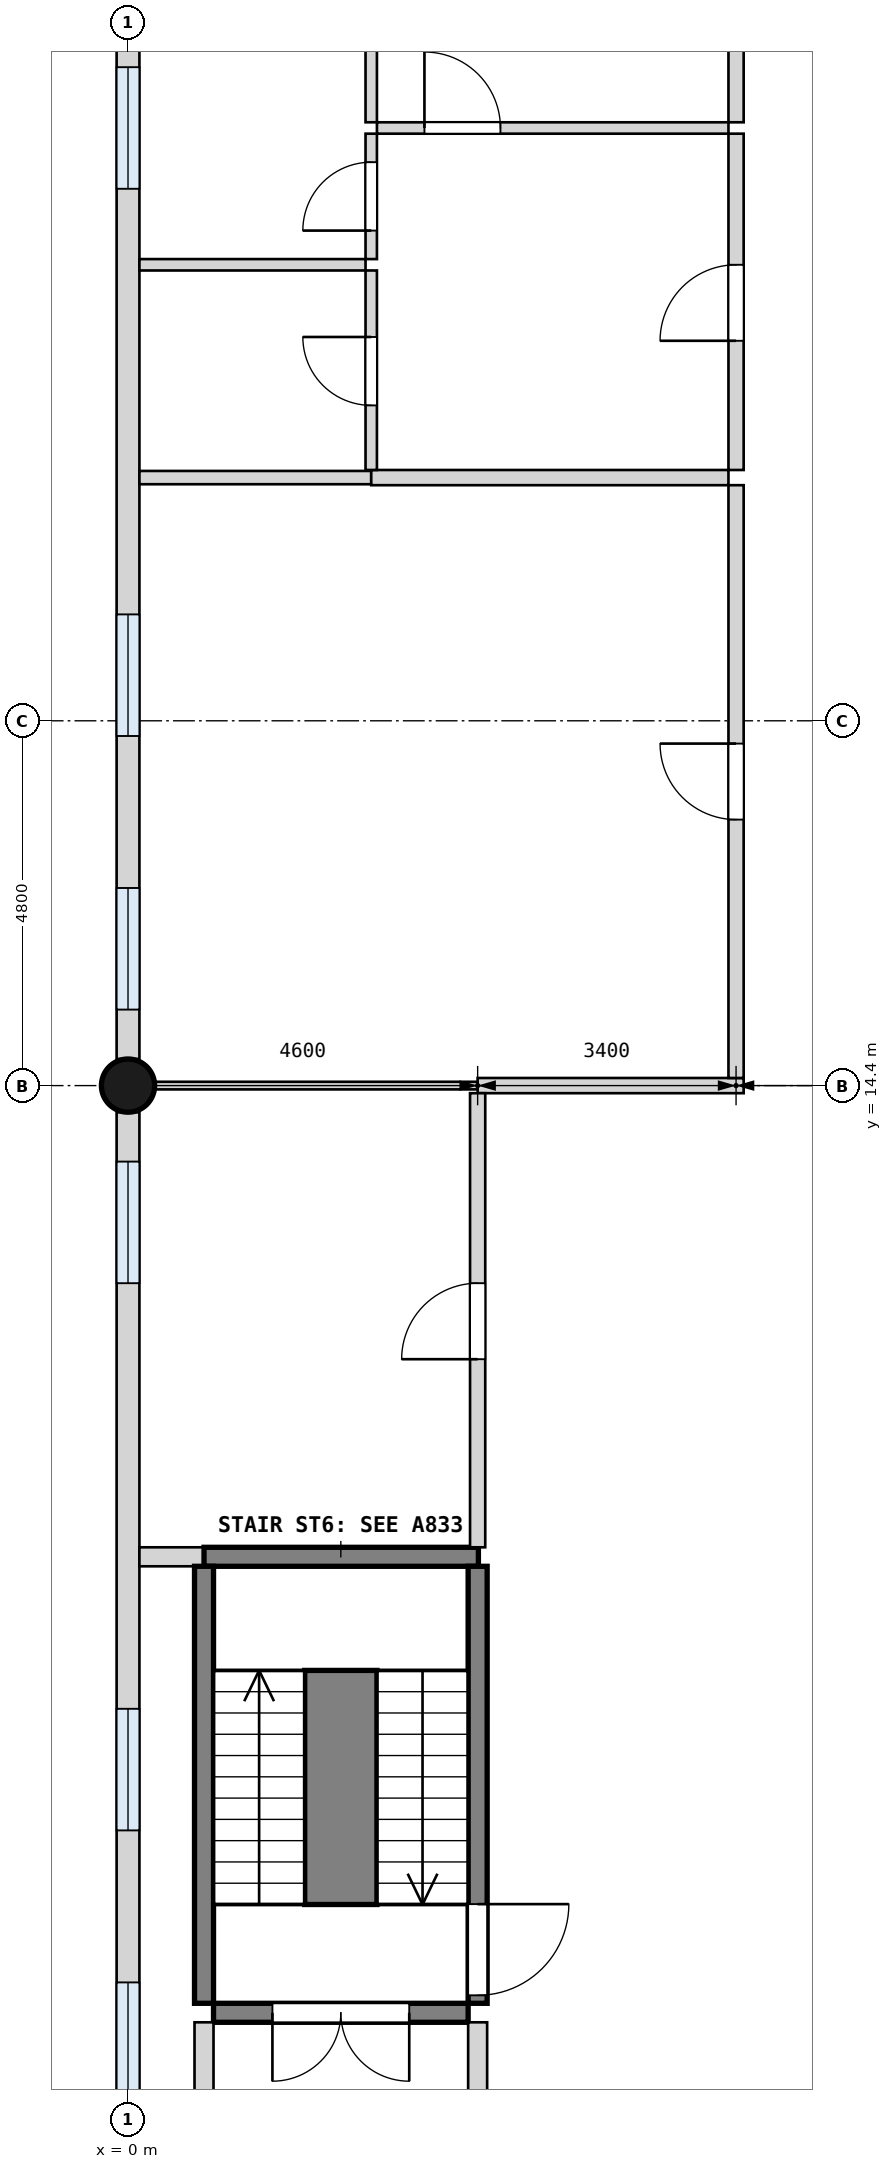
"""IFC4 building model, lengths in metres.
Left out: names, types, materials, properties, quantities, classifications, styles, units other than length and angle.
Written with IfcOpenShell. Run it as: python <this file> out.ifc"""

import sys

from ifc_helpers import new_model, si_unit, direction, frame, frame_2d, origin, origin_2d, place, context, subcontext, project, spatial, rectangle, circle, extrude, element, fill, save


model = new_model("IFC4")
c1 = context("Model", 3, precision=1e-05, world=origin(), true_north=direction((0.0, 1.0)))
c2 = subcontext(c1, "Body", "Model", "MODEL_VIEW")
j1 = project(units=[si_unit("LENGTHUNIT", "METRE"), si_unit("PLANEANGLEUNIT", "RADIAN")], contexts=[c1])
p1 = place(None, origin())
s1 = spatial("IfcSite", under=j1, at=p1, CompositionType="ELEMENT")
p2 = place(p1, origin())
s2 = spatial("IfcBuilding", under=s1, at=p2, CompositionType="ELEMENT")
p3 = place(p2, origin())
s3 = spatial("IfcBuildingStorey", under=s2, at=p3, CompositionType="ELEMENT", Elevation=0.0)
p4 = place(p3, frame((0.0, 14.4, 0.0), z_axis=(0.0, 0.0, 1.0), x_axis=(1.0, 0.0, 0.0)))
e1 = element("IfcColumn", 1, at=p4, inside=s3, PredefinedType="COLUMN", context=c2, shape_type="SweptSolid", body=[
    extrude(circle(Radius=0.35, at=origin_2d()), origin(), (0.0, 0.0, 1.0), 4.2),
])
p5 = place(p3, frame((0.0, 0.35, 0.0), z_axis=(0.0, 0.0, 1.0), x_axis=(0.0, 1.0, 0.0)))
e2 = element("IfcWall", 2, at=p5, inside=s3, PredefinedType="SOLIDWALL", context=c2, shape_type="SweptSolid", body=[
    extrude(rectangle(XDim=13.7, YDim=0.3, at=frame_2d((6.85, 0.0))), origin(), (0.0, 0.0, 1.0), 3.0),
])
p6 = place(p5, frame((0.65, 0.0, 0.3)))
e3 = element("IfcOpeningElement", 3, at=p6, cuts=e2, PredefinedType="OPENING", context=c2, shape_type="SweptSolid", body=[
    extrude(rectangle(XDim=1.6, YDim=2.4, at=frame_2d((0.8, 1.2))), frame((0.0, 0.16, 0.0), z_axis=(0.0, -1.0, 0.0), x_axis=(1.0, 0.0, 0.0)), (0.0, 0.0, 1.0), 0.32),
])
p7 = place(p5, frame((4.25, 0.0, 0.3)))
e4 = element("IfcOpeningElement", 4, at=p7, cuts=e2, PredefinedType="OPENING", context=c2, shape_type="SweptSolid", body=[
    extrude(rectangle(XDim=1.6, YDim=2.4, at=frame_2d((0.8, 1.2))), frame((0.0, 0.16, 0.0), z_axis=(0.0, -1.0, 0.0), x_axis=(1.0, 0.0, 0.0)), (0.0, 0.0, 1.0), 0.32),
])
p8 = place(p5, frame((11.45, 0.0, 0.3)))
e5 = element("IfcOpeningElement", 5, at=p8, cuts=e2, PredefinedType="OPENING", context=c2, shape_type="SweptSolid", body=[
    extrude(rectangle(XDim=1.6, YDim=2.4, at=frame_2d((0.8, 1.2))), frame((0.0, 0.16, 0.0), z_axis=(0.0, -1.0, 0.0), x_axis=(1.0, 0.0, 0.0)), (0.0, 0.0, 1.0), 0.32),
])
p9 = place(p3, frame((0.0, 14.75, 0.0), z_axis=(0.0, 0.0, 1.0), x_axis=(0.0, 1.0, 0.0)))
e6 = element("IfcWall", 6, at=p9, inside=s3, PredefinedType="SOLIDWALL", context=c2, shape_type="SweptSolid", body=[
    extrude(rectangle(XDim=13.7, YDim=0.3, at=frame_2d((6.85, 0.0))), origin(), (0.0, 0.0, 1.0), 3.0),
])
p10 = place(p9, frame((0.65, 0.0, 0.3)))
e7 = element("IfcOpeningElement", 7, at=p10, cuts=e6, PredefinedType="OPENING", context=c2, shape_type="SweptSolid", body=[
    extrude(rectangle(XDim=1.6, YDim=2.4, at=frame_2d((0.8, 1.2))), frame((0.0, 0.16, 0.0), z_axis=(0.0, -1.0, 0.0), x_axis=(1.0, 0.0, 0.0)), (0.0, 0.0, 1.0), 0.32),
])
p11 = place(p9, frame((4.25, 0.0, 0.3)))
e8 = element("IfcOpeningElement", 8, at=p11, cuts=e6, PredefinedType="OPENING", context=c2, shape_type="SweptSolid", body=[
    extrude(rectangle(XDim=1.6, YDim=2.4, at=frame_2d((0.8, 1.2))), frame((0.0, 0.16, 0.0), z_axis=(0.0, -1.0, 0.0), x_axis=(1.0, 0.0, 0.0)), (0.0, 0.0, 1.0), 0.32),
])
p12 = place(p9, frame((11.45, 0.0, 0.3)))
e9 = element("IfcOpeningElement", 9, at=p12, cuts=e6, PredefinedType="OPENING", context=c2, shape_type="SweptSolid", body=[
    extrude(rectangle(XDim=1.6, YDim=2.4, at=frame_2d((0.8, 1.2))), frame((0.0, 0.16, 0.0), z_axis=(0.0, -1.0, 0.0), x_axis=(1.0, 0.0, 0.0)), (0.0, 0.0, 1.0), 0.32),
])
p13 = place(p3, frame((1.125, 2.2, 0.0), z_axis=(0.0, 0.0, 1.0), x_axis=(1.0, 0.0, 0.0)))
e10 = element("IfcWall", 10, at=p13, inside=s3, PredefinedType="SHEAR", context=c2, shape_type="SweptSolid", body=[
    extrude(rectangle(XDim=3.35, YDim=0.25, at=frame_2d((1.675, 0.0))), origin(), (0.0, 0.0, 1.0), 3.9),
])
p14 = place(p13, frame((0.775, 0.0, 0.0)))
e11 = element("IfcOpeningElement", 11, at=p14, cuts=e10, PredefinedType="OPENING", context=c2, shape_type="SweptSolid", body=[
    extrude(rectangle(XDim=1.8, YDim=2.1, at=frame_2d((0.9, 1.05))), frame((0.0, 0.135, 0.0), z_axis=(0.0, -1.0, 0.0), x_axis=(1.0, 0.0, 0.0)), (0.0, 0.0, 1.0), 0.27),
])
p15 = place(p3, frame((0.15, 8.2, 0.0), z_axis=(0.0, 0.0, 1.0), x_axis=(1.0, 0.0, 0.0)))
e12 = element("IfcWall", 12, at=p15, inside=s3, PredefinedType="PARTITIONING", context=c2, shape_type="SweptSolid", body=[
    extrude(rectangle(XDim=0.85, YDim=0.25, at=frame_2d((0.425, 0.0))), origin(), (0.0, 0.0, 1.0), 3.9),
])
p16 = place(p3, frame((1.0, 8.2, 0.0), z_axis=(0.0, 0.0, 1.0), x_axis=(1.0, 0.0, 0.0)))
e13 = element("IfcWall", 13, at=p16, inside=s3, PredefinedType="SHEAR", context=c2, shape_type="SweptSolid", body=[
    extrude(rectangle(XDim=3.61, YDim=0.25, at=frame_2d((1.805, 0.0))), origin(), (0.0, 0.0, 1.0), 3.9),
])
p17 = place(p3, frame((0.32, 14.4, 0.0), z_axis=(0.0, 0.0, 1.0), x_axis=(1.0, 0.0, 0.0)))
e14 = element("IfcWall", 14, at=p17, inside=s3, PredefinedType="PARTITIONING", context=c2, shape_type="SweptSolid", body=[
    extrude(rectangle(XDim=4.28, YDim=0.1, at=frame_2d((2.14, 0.0))), origin(), (0.0, 0.0, 1.0), 3.1),
])
p18 = place(p3, frame((4.6, 14.4, 0.0), z_axis=(0.0, 0.0, 1.0), x_axis=(1.0, 0.0, 0.0)))
e15 = element("IfcWall", 15, at=p18, inside=s3, PredefinedType="PARTITIONING", context=c2, shape_type="SweptSolid", body=[
    extrude(rectangle(XDim=3.5, YDim=0.2, at=frame_2d((1.75, 0.0))), origin(), (0.0, 0.0, 1.0), 3.1),
])
p19 = place(p3, frame((0.15, 22.4, 0.0), z_axis=(0.0, 0.0, 1.0), x_axis=(1.0, 0.0, 0.0)))
e16 = element("IfcWall", 16, at=p19, inside=s3, PredefinedType="PARTITIONING", context=c2, shape_type="SweptSolid", body=[
    extrude(rectangle(XDim=3.05, YDim=0.175, at=frame_2d((1.525, 0.0))), origin(), (0.0, 0.0, 1.0), 3.9),
])
p20 = place(p3, frame((3.2, 22.4, 0.0), z_axis=(0.0, 0.0, 1.0), x_axis=(1.0, 0.0, 0.0)))
e17 = element("IfcWall", 17, at=p20, inside=s3, PredefinedType="PARTITIONING", context=c2, shape_type="SweptSolid", body=[
    extrude(rectangle(XDim=4.7, YDim=0.2, at=frame_2d((2.35, 0.0))), origin(), (0.0, 0.0, 1.0), 3.9),
])
p21 = place(p3, frame((0.15, 25.2, 0.0), z_axis=(0.0, 0.0, 1.0), x_axis=(1.0, 0.0, 0.0)))
e18 = element("IfcWall", 18, at=p21, inside=s3, PredefinedType="PARTITIONING", context=c2, shape_type="SweptSolid", body=[
    extrude(rectangle(XDim=2.975, YDim=0.15, at=frame_2d((1.488, 0.0))), origin(), (0.0, 0.0, 1.0), 3.9),
])
p22 = place(p3, frame((3.275, 27.0, 0.0), z_axis=(0.0, 0.0, 1.0), x_axis=(1.0, 0.0, 0.0)))
e19 = element("IfcWall", 19, at=p22, inside=s3, PredefinedType="PARTITIONING", context=c2, shape_type="SweptSolid", body=[
    extrude(rectangle(XDim=4.625, YDim=0.15, at=frame_2d((2.312, 0.0))), origin(), (0.0, 0.0, 1.0), 3.9),
])
p23 = place(p22, frame((0.625, 0.0, 0.0)))
e20 = element("IfcOpeningElement", 20, at=p23, cuts=e19, PredefinedType="OPENING", context=c2, shape_type="SweptSolid", body=[
    extrude(rectangle(XDim=1.0, YDim=2.1, at=frame_2d((0.5, 1.05))), frame((0.0, 0.085, 0.0), z_axis=(0.0, -1.0, 0.0), x_axis=(1.0, 0.0, 0.0)), (0.0, 0.0, 1.0), 0.17),
])
p24 = place(p3, frame((1.0, 0.15, 0.0), z_axis=(0.0, 0.0, 1.0), x_axis=(0.0, 1.0, 0.0)))
e21 = element("IfcWall", 21, at=p24, inside=s3, PredefinedType="PARTITIONING", context=c2, shape_type="SweptSolid", body=[
    extrude(rectangle(XDim=1.925, YDim=0.25, at=frame_2d((0.962, 0.0))), origin(), (0.0, 0.0, 1.0), 3.9),
])
p25 = place(p3, frame((1.0, 2.325, 0.0), z_axis=(0.0, 0.0, 1.0), x_axis=(0.0, 1.0, 0.0)))
e22 = element("IfcWall", 22, at=p25, inside=s3, PredefinedType="SHEAR", context=c2, shape_type="SweptSolid", body=[
    extrude(rectangle(XDim=5.75, YDim=0.25, at=frame_2d((2.875, 0.0))), origin(), (0.0, 0.0, 1.0), 3.9),
])
p26 = place(p3, frame((3.2, 22.5, 0.0), z_axis=(0.0, 0.0, 1.0), x_axis=(0.0, 1.0, 0.0)))
e23 = element("IfcWall", 23, at=p26, inside=s3, PredefinedType="PARTITIONING", context=c2, shape_type="SweptSolid", body=[
    extrude(rectangle(XDim=2.625, YDim=0.15, at=frame_2d((1.312, 0.0))), origin(), (0.0, 0.0, 1.0), 3.0),
])
p27 = place(p26, frame((0.85, 0.0, 0.0)))
e24 = element("IfcOpeningElement", 24, at=p27, cuts=e23, PredefinedType="OPENING", context=c2, shape_type="SweptSolid", body=[
    extrude(rectangle(XDim=0.9, YDim=2.1, at=frame_2d((0.45, 1.05))), frame((0.0, 0.085, 0.0), z_axis=(0.0, -1.0, 0.0), x_axis=(1.0, 0.0, 0.0)), (0.0, 0.0, 1.0), 0.17),
])
p28 = place(p3, frame((3.2, 25.275, 0.0), z_axis=(0.0, 0.0, 1.0), x_axis=(0.0, 1.0, 0.0)))
e25 = element("IfcWall", 25, at=p28, inside=s3, PredefinedType="PARTITIONING", context=c2, shape_type="SweptSolid", body=[
    extrude(rectangle(XDim=1.65, YDim=0.15, at=frame_2d((0.825, 0.0))), origin(), (0.0, 0.0, 1.0), 3.0),
])
p29 = place(p28, frame((0.375, 0.0, 0.0)))
e26 = element("IfcOpeningElement", 26, at=p29, cuts=e25, PredefinedType="OPENING", context=c2, shape_type="SweptSolid", body=[
    extrude(rectangle(XDim=0.9, YDim=2.1, at=frame_2d((0.45, 1.05))), frame((0.0, 0.085, 0.0), z_axis=(0.0, -1.0, 0.0), x_axis=(1.0, 0.0, 0.0)), (0.0, 0.0, 1.0), 0.17),
])
p30 = place(p3, frame((3.2, 27.075, 0.0), z_axis=(0.0, 0.0, 1.0), x_axis=(0.0, 1.0, 0.0)))
e27 = element("IfcWall", 27, at=p30, inside=s3, PredefinedType="PARTITIONING", context=c2, shape_type="SweptSolid", body=[
    extrude(rectangle(XDim=1.625, YDim=0.15, at=frame_2d((0.812, 0.0))), origin(), (0.0, 0.0, 1.0), 3.0),
])
p31 = place(p3, frame((4.6, 0.15, 0.0), z_axis=(0.0, 0.0, 1.0), x_axis=(0.0, 1.0, 0.0)))
e28 = element("IfcWall", 28, at=p31, inside=s3, PredefinedType="PARTITIONING", context=c2, shape_type="SweptSolid", body=[
    extrude(rectangle(XDim=1.925, YDim=0.25, at=frame_2d((0.962, 0.0))), origin(), (0.0, 0.0, 1.0), 3.9),
])
p32 = place(p3, frame((4.6, 2.325, 0.0), z_axis=(0.0, 0.0, 1.0), x_axis=(0.0, 1.0, 0.0)))
e29 = element("IfcWall", 29, at=p32, inside=s3, PredefinedType="SHEAR", context=c2, shape_type="SweptSolid", body=[
    extrude(rectangle(XDim=5.75, YDim=0.25, at=frame_2d((2.875, 0.0))), origin(), (0.0, 0.0, 1.0), 3.9),
])
p33 = place(p32, frame((0.105, 0.0, 0.0)))
e30 = element("IfcOpeningElement", 30, at=p33, cuts=e29, PredefinedType="OPENING", context=c2, shape_type="SweptSolid", body=[
    extrude(rectangle(XDim=1.2, YDim=2.1, at=frame_2d((0.6, 1.05))), frame((0.0, 0.135, 0.0), z_axis=(0.0, -1.0, 0.0), x_axis=(1.0, 0.0, 0.0)), (0.0, 0.0, 1.0), 0.27),
])
p34 = place(p3, frame((4.6, 8.325, 0.0), z_axis=(0.0, 0.0, 1.0), x_axis=(0.0, 1.0, 0.0)))
e31 = element("IfcWall", 31, at=p34, inside=s3, PredefinedType="PARTITIONING", context=c2, shape_type="SweptSolid", body=[
    extrude(rectangle(XDim=5.975, YDim=0.2, at=frame_2d((2.988, 0.0))), origin(), (0.0, 0.0, 1.0), 3.9),
])
p35 = place(p34, frame((2.475, 0.0, 0.0)))
e32 = element("IfcOpeningElement", 32, at=p35, cuts=e31, PredefinedType="OPENING", context=c2, shape_type="SweptSolid", body=[
    extrude(rectangle(XDim=1.0, YDim=2.1, at=frame_2d((0.5, 1.05))), frame((0.0, 0.11, 0.0), z_axis=(0.0, -1.0, 0.0), x_axis=(1.0, 0.0, 0.0)), (0.0, 0.0, 1.0), 0.22),
])
p36 = place(p3, frame((8.0, 14.5, 0.0), z_axis=(0.0, 0.0, 1.0), x_axis=(0.0, 1.0, 0.0)))
e33 = element("IfcWall", 33, at=p36, inside=s3, PredefinedType="PARTITIONING", context=c2, shape_type="SweptSolid", body=[
    extrude(rectangle(XDim=7.8, YDim=0.2, at=frame_2d((3.9, 0.0))), origin(), (0.0, 0.0, 1.0), 3.9),
])
p37 = place(p36, frame((3.4, 0.0, 0.0)))
e34 = element("IfcOpeningElement", 34, at=p37, cuts=e33, PredefinedType="OPENING", context=c2, shape_type="SweptSolid", body=[
    extrude(rectangle(XDim=1.0, YDim=2.1, at=frame_2d((0.5, 1.05))), frame((0.0, 0.11, 0.0), z_axis=(0.0, -1.0, 0.0), x_axis=(1.0, 0.0, 0.0)), (0.0, 0.0, 1.0), 0.22),
])
p38 = place(p3, frame((8.0, 22.5, 0.0), z_axis=(0.0, 0.0, 1.0), x_axis=(0.0, 1.0, 0.0)))
e35 = element("IfcWall", 35, at=p38, inside=s3, PredefinedType="PARTITIONING", context=c2, shape_type="SweptSolid", body=[
    extrude(rectangle(XDim=4.425, YDim=0.2, at=frame_2d((2.212, 0.0))), origin(), (0.0, 0.0, 1.0), 3.9),
])
p39 = place(p38, frame((1.7, 0.0, 0.0)))
e36 = element("IfcOpeningElement", 36, at=p39, cuts=e35, PredefinedType="OPENING", context=c2, shape_type="SweptSolid", body=[
    extrude(rectangle(XDim=1.0, YDim=2.1, at=frame_2d((0.5, 1.05))), frame((0.0, 0.11, 0.0), z_axis=(0.0, -1.0, 0.0), x_axis=(1.0, 0.0, 0.0)), (0.0, 0.0, 1.0), 0.22),
])
p40 = place(p3, frame((8.0, 27.075, 0.0), z_axis=(0.0, 0.0, 1.0), x_axis=(0.0, 1.0, 0.0)))
e37 = element("IfcWall", 37, at=p40, inside=s3, PredefinedType="PARTITIONING", context=c2, shape_type="SweptSolid", body=[
    extrude(rectangle(XDim=1.625, YDim=0.2, at=frame_2d((0.812, 0.0))), origin(), (0.0, 0.0, 1.0), 3.9),
])
p41 = place(p3, frame((2.8, 3.625, 0.0), z_axis=(0.0, 0.0, 1.0), x_axis=(0.0, 1.0, 0.0)))
e38 = element("IfcWall", 38, at=p41, inside=s3, PredefinedType="SHEAR", context=c2, shape_type="SweptSolid", body=[
    extrude(rectangle(XDim=3.08, YDim=0.95, at=frame_2d((1.54, 0.0))), origin(), (0.0, 0.0, 1.0), 4.2),
])
p42 = place(p33, frame((1.2, 0.0, 0.0), z_axis=(0.0, 0.0, 1.0), x_axis=(-1.0, 0.0, 0.0)))
e39 = element("IfcDoor", 39, at=p42, inside=s3, OperationType="SINGLE_SWING_LEFT", PredefinedType="DOOR", context=c2, shape_type="SweptSolid", body=[
    extrude(rectangle(XDim=1.2, YDim=2.1, at=frame_2d((0.6, 1.05))), frame((0.0, 0.025, 0.0), z_axis=(0.0, -1.0, 0.0), x_axis=(1.0, 0.0, 0.0)), (0.0, 0.0, 1.0), 0.05),
])
fill(e30, e39)
p43 = place(p14, frame((1.8, 0.0, 0.0), z_axis=(0.0, 0.0, 1.0), x_axis=(-1.0, 0.0, 0.0)))
e40 = element("IfcDoor", 40, at=p43, inside=s3, OperationType="DOUBLE_DOOR_SINGLE_SWING", PredefinedType="DOOR", context=c2, shape_type="SweptSolid", body=[
    extrude(rectangle(XDim=1.8, YDim=2.1, at=frame_2d((0.9, 1.05))), frame((0.0, 0.025, 0.0), z_axis=(0.0, -1.0, 0.0), x_axis=(1.0, 0.0, 0.0)), (0.0, 0.0, 1.0), 0.05),
])
fill(e11, e40)
p44 = place(p35, origin())
e41 = element("IfcDoor", 41, at=p44, inside=s3, OperationType="SINGLE_SWING_LEFT", PredefinedType="DOOR", context=c2, shape_type="SweptSolid", body=[
    extrude(rectangle(XDim=1.0, YDim=2.1, at=frame_2d((0.5, 1.05))), frame((0.0, 0.025, 0.0), z_axis=(0.0, -1.0, 0.0), x_axis=(1.0, 0.0, 0.0)), (0.0, 0.0, 1.0), 0.05),
])
fill(e32, e41)
p45 = place(p37, origin())
e42 = element("IfcDoor", 42, at=p45, inside=s3, OperationType="SINGLE_SWING_RIGHT", PredefinedType="DOOR", context=c2, shape_type="SweptSolid", body=[
    extrude(rectangle(XDim=1.0, YDim=2.1, at=frame_2d((0.5, 1.05))), frame((0.0, 0.025, 0.0), z_axis=(0.0, -1.0, 0.0), x_axis=(1.0, 0.0, 0.0)), (0.0, 0.0, 1.0), 0.05),
])
fill(e34, e42)
p46 = place(p39, origin())
e43 = element("IfcDoor", 43, at=p46, inside=s3, OperationType="SINGLE_SWING_LEFT", PredefinedType="DOOR", context=c2, shape_type="SweptSolid", body=[
    extrude(rectangle(XDim=1.0, YDim=2.1, at=frame_2d((0.5, 1.05))), frame((0.0, 0.025, 0.0), z_axis=(0.0, -1.0, 0.0), x_axis=(1.0, 0.0, 0.0)), (0.0, 0.0, 1.0), 0.05),
])
fill(e36, e43)
p47 = place(p27, origin())
e44 = element("IfcDoor", 44, at=p47, inside=s3, OperationType="SINGLE_SWING_RIGHT", PredefinedType="DOOR", context=c2, shape_type="SweptSolid", body=[
    extrude(rectangle(XDim=0.9, YDim=2.1, at=frame_2d((0.45, 1.05))), frame((0.0, 0.025, 0.0), z_axis=(0.0, -1.0, 0.0), x_axis=(1.0, 0.0, 0.0)), (0.0, 0.0, 1.0), 0.05),
])
fill(e24, e44)
p48 = place(p29, origin())
e45 = element("IfcDoor", 45, at=p48, inside=s3, OperationType="SINGLE_SWING_LEFT", PredefinedType="DOOR", context=c2, shape_type="SweptSolid", body=[
    extrude(rectangle(XDim=0.9, YDim=2.1, at=frame_2d((0.45, 1.05))), frame((0.0, 0.025, 0.0), z_axis=(0.0, -1.0, 0.0), x_axis=(1.0, 0.0, 0.0)), (0.0, 0.0, 1.0), 0.05),
])
fill(e26, e45)
p49 = place(p23, origin())
e46 = element("IfcDoor", 46, at=p49, inside=s3, OperationType="SINGLE_SWING_LEFT", PredefinedType="DOOR", context=c2, shape_type="SweptSolid", body=[
    extrude(rectangle(XDim=1.0, YDim=2.1, at=frame_2d((0.5, 1.05))), frame((0.0, 0.025, 0.0), z_axis=(0.0, -1.0, 0.0), x_axis=(1.0, 0.0, 0.0)), (0.0, 0.0, 1.0), 0.05),
])
fill(e20, e46)
p50 = place(p6, origin())
e47 = element("IfcWindow", 47, at=p50, inside=s3, PartitioningType="SINGLE_PANEL", PredefinedType="WINDOW", context=c2, shape_type="SweptSolid", body=[
    extrude(rectangle(XDim=1.6, YDim=2.4, at=frame_2d((0.8, 1.2))), frame((0.0, 0.03, 0.0), z_axis=(0.0, -1.0, 0.0), x_axis=(1.0, 0.0, 0.0)), (0.0, 0.0, 1.0), 0.06),
])
fill(e3, e47)
p51 = place(p7, origin())
e48 = element("IfcWindow", 48, at=p51, inside=s3, PartitioningType="SINGLE_PANEL", PredefinedType="WINDOW", context=c2, shape_type="SweptSolid", body=[
    extrude(rectangle(XDim=1.6, YDim=2.4, at=frame_2d((0.8, 1.2))), frame((0.0, 0.03, 0.0), z_axis=(0.0, -1.0, 0.0), x_axis=(1.0, 0.0, 0.0)), (0.0, 0.0, 1.0), 0.06),
])
fill(e4, e48)
p52 = place(p8, origin())
e49 = element("IfcWindow", 49, at=p52, inside=s3, PartitioningType="SINGLE_PANEL", PredefinedType="WINDOW", context=c2, shape_type="SweptSolid", body=[
    extrude(rectangle(XDim=1.6, YDim=2.4, at=frame_2d((0.8, 1.2))), frame((0.0, 0.03, 0.0), z_axis=(0.0, -1.0, 0.0), x_axis=(1.0, 0.0, 0.0)), (0.0, 0.0, 1.0), 0.06),
])
fill(e5, e49)
p53 = place(p10, origin())
e50 = element("IfcWindow", 50, at=p53, inside=s3, PartitioningType="SINGLE_PANEL", PredefinedType="WINDOW", context=c2, shape_type="SweptSolid", body=[
    extrude(rectangle(XDim=1.6, YDim=2.4, at=frame_2d((0.8, 1.2))), frame((0.0, 0.03, 0.0), z_axis=(0.0, -1.0, 0.0), x_axis=(1.0, 0.0, 0.0)), (0.0, 0.0, 1.0), 0.06),
])
fill(e7, e50)
p54 = place(p11, origin())
e51 = element("IfcWindow", 51, at=p54, inside=s3, PartitioningType="SINGLE_PANEL", PredefinedType="WINDOW", context=c2, shape_type="SweptSolid", body=[
    extrude(rectangle(XDim=1.6, YDim=2.4, at=frame_2d((0.8, 1.2))), frame((0.0, 0.03, 0.0), z_axis=(0.0, -1.0, 0.0), x_axis=(1.0, 0.0, 0.0)), (0.0, 0.0, 1.0), 0.06),
])
fill(e8, e51)
p55 = place(p12, origin())
e52 = element("IfcWindow", 52, at=p55, inside=s3, PartitioningType="SINGLE_PANEL", PredefinedType="WINDOW", context=c2, shape_type="SweptSolid", body=[
    extrude(rectangle(XDim=1.6, YDim=2.4, at=frame_2d((0.8, 1.2))), frame((0.0, 0.03, 0.0), z_axis=(0.0, -1.0, 0.0), x_axis=(1.0, 0.0, 0.0)), (0.0, 0.0, 1.0), 0.06),
])
fill(e9, e52)
save(model, sys.argv[1])
